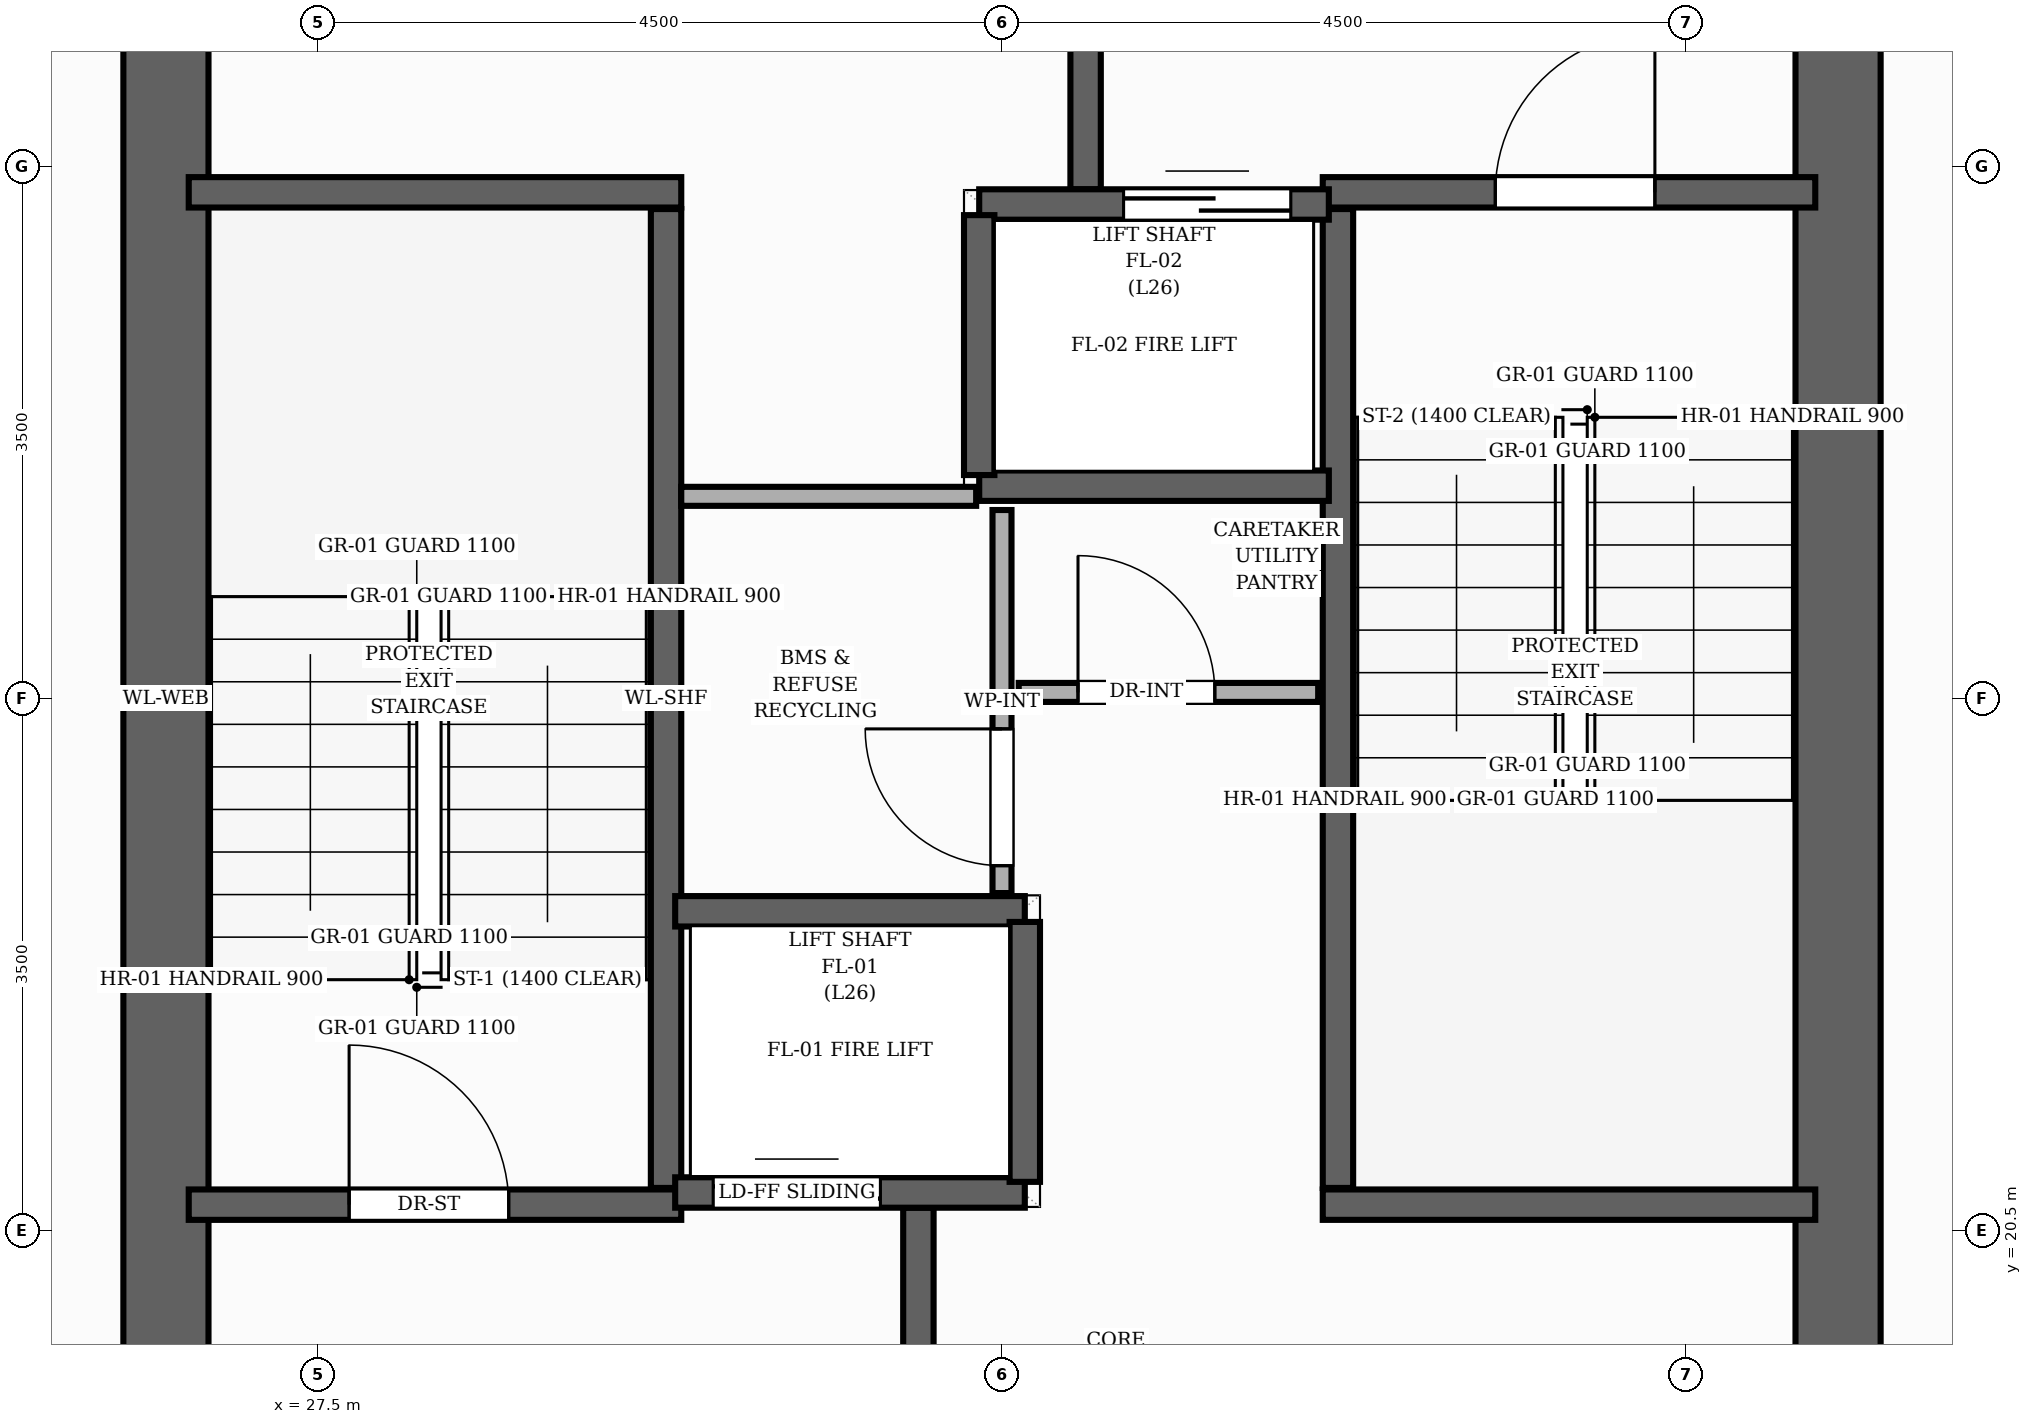
"""IFC4 building model, lengths in metres.
Left out: names, types, materials, properties, quantities, classifications, styles, units other than length and angle.
Written with IfcOpenShell. Run it as: python <this file> out.ifc"""

import sys

from ifc_helpers import new_model, si_unit, direction, frame, frame_2d, origin, place, context, subcontext, project, spatial, rectangle, extrude, element, fill, save


model = new_model("IFC4")
c1 = context("Model", 3, precision=1e-05, world=origin(), true_north=direction((0.0, 1.0)))
c2 = subcontext(c1, "Body", "Model", "MODEL_VIEW")
j1 = project(units=[si_unit("LENGTHUNIT", "METRE"), si_unit("PLANEANGLEUNIT", "RADIAN")], contexts=[c1])
p1 = place(None, origin())
s1 = spatial("IfcSite", under=j1, at=p1, CompositionType="ELEMENT")
p2 = place(p1, origin())
s2 = spatial("IfcBuilding", under=s1, at=p2, CompositionType="ELEMENT")
p3 = place(p2, frame((0.0, 0.0, 90.08)))
s3 = spatial("IfcBuildingStorey", under=s2, at=p3, CompositionType="ELEMENT", Elevation=90.08)
for number, where, z_axis, x_axis in (
    (1, (26.5, 17.35, 0.0), (0.0, 0.0, 1.0), (0.0, 1.0, 0.0)),
    (2, (37.5, 17.35, 0.0), (0.0, 0.0, 1.0), (0.0, 1.0, 0.0)),
):
    element("IfcWall", number, at=place(p3, frame(where, z_axis=z_axis, x_axis=x_axis)), inside=s3, PredefinedType="SHEAR", context=c2, shape_type="SweptSolid", body=[
        extrude(rectangle(XDim=13.3, YDim=0.56, at=frame_2d((6.65, 0.0))), origin(), (0.0, 0.0, 1.0), 3.2),
    ])
p4 = place(p3, frame((29.79, 20.78, 0.0), z_axis=(0.0, 0.0, 1.0), x_axis=(0.0, 1.0, 0.0)))
e3 = element("IfcWall", 3, at=p4, inside=s3, PredefinedType="SHEAR", context=c2, shape_type="SweptSolid", body=[
    extrude(rectangle(XDim=6.44, YDim=0.2, at=frame_2d((3.22, 0.0))), origin(), (0.0, 0.0, 1.0), 3.2),
])
p5 = place(p3, frame((26.65, 27.33, 0.0), z_axis=(0.0, 0.0, 1.0), x_axis=(1.0, 0.0, 0.0)))
e4 = element("IfcWall", 4, at=p5, inside=s3, PredefinedType="SHEAR", context=c2, shape_type="SweptSolid", body=[
    extrude(rectangle(XDim=3.24, YDim=0.2, at=frame_2d((1.62, 0.0))), origin(), (0.0, 0.0, 1.0), 3.2),
])
p6 = place(p3, frame((26.65, 20.67, 0.0), z_axis=(0.0, 0.0, 1.0), x_axis=(1.0, 0.0, 0.0)))
e5 = element("IfcWall", 5, at=p6, inside=s3, PredefinedType="SHEAR", context=c2, shape_type="SweptSolid", body=[
    extrude(rectangle(XDim=3.24, YDim=0.2, at=frame_2d((1.62, 0.0))), origin(), (0.0, 0.0, 1.0), 3.2),
])
p7 = place(p6, frame((1.055, 0.0, 0.0)))
e6 = element("IfcOpeningElement", 6, at=p7, cuts=e5, PredefinedType="OPENING", context=c2, shape_type="SweptSolid", body=[
    extrude(rectangle(XDim=1.05, YDim=2.15, at=frame_2d((0.525, 1.075))), frame((0.0, 0.11, 0.0), z_axis=(0.0, -1.0, 0.0), x_axis=(1.0, 0.0, 0.0)), (0.0, 0.0, 1.0), 0.22),
])
p8 = place(p3, frame((34.21, 20.78, 0.0), z_axis=(0.0, 0.0, 1.0), x_axis=(0.0, 1.0, 0.0)))
e7 = element("IfcWall", 7, at=p8, inside=s3, PredefinedType="SHEAR", context=c2, shape_type="SweptSolid", body=[
    extrude(rectangle(XDim=6.44, YDim=0.2, at=frame_2d((3.22, 0.0))), origin(), (0.0, 0.0, 1.0), 3.2),
])
p9 = place(p3, frame((34.11, 20.67, 0.0), z_axis=(0.0, 0.0, 1.0), x_axis=(1.0, 0.0, 0.0)))
e8 = element("IfcWall", 8, at=p9, inside=s3, PredefinedType="SHEAR", context=c2, shape_type="SweptSolid", body=[
    extrude(rectangle(XDim=3.24, YDim=0.2, at=frame_2d((1.62, 0.0))), origin(), (0.0, 0.0, 1.0), 3.2),
])
p10 = place(p3, frame((34.11, 27.33, 0.0), z_axis=(0.0, 0.0, 1.0), x_axis=(1.0, 0.0, 0.0)))
e9 = element("IfcWall", 9, at=p10, inside=s3, PredefinedType="SHEAR", context=c2, shape_type="SweptSolid", body=[
    extrude(rectangle(XDim=3.24, YDim=0.2, at=frame_2d((1.62, 0.0))), origin(), (0.0, 0.0, 1.0), 3.2),
])
p11 = place(p10, frame((1.135, 0.0, 0.0)))
e10 = element("IfcOpeningElement", 10, at=p11, cuts=e9, PredefinedType="OPENING", context=c2, shape_type="SweptSolid", body=[
    extrude(rectangle(XDim=1.05, YDim=2.15, at=frame_2d((0.525, 1.075))), frame((0.0, 0.11, 0.0), z_axis=(0.0, -1.0, 0.0), x_axis=(1.0, 0.0, 0.0)), (0.0, 0.0, 1.0), 0.22),
])
for number, where, z_axis, x_axis in (
    (11, (31.45, 17.15, 0.0), (0.0, 0.0, 1.0), (0.0, 1.0, 0.0)),
    (12, (32.55, 27.35, 0.0), (0.0, 0.0, 1.0), (0.0, 1.0, 0.0)),
):
    element("IfcWall", number, at=place(p3, frame(where, z_axis=z_axis, x_axis=x_axis)), inside=s3, PredefinedType="SHEAR", context=c2, shape_type="SweptSolid", body=[
        extrude(rectangle(XDim=3.5, YDim=0.2, at=frame_2d((1.75, 0.0))), origin(), (0.0, 0.0, 1.0), 3.2),
    ])
p12 = place(p3, frame((29.85, 20.75, 0.0), z_axis=(0.0, 0.0, 1.0), x_axis=(1.0, 0.0, 0.0)))
e13 = element("IfcWall", 13, at=p12, inside=s3, PredefinedType="SHEAR", context=c2, shape_type="SweptSolid", body=[
    extrude(rectangle(XDim=2.3, YDim=0.2, at=frame_2d((1.15, 0.0))), origin(), (0.0, 0.0, 1.0), 3.2),
])
p13 = place(p12, frame((0.25, 0.0, 0.0)))
e14 = element("IfcOpeningElement", 14, at=p13, cuts=e13, PredefinedType="OPENING", context=c2, shape_type="SweptSolid", body=[
    extrude(rectangle(XDim=1.1, YDim=2.15, at=frame_2d((0.55, 1.075))), frame((0.0, 0.11, 0.0), z_axis=(0.0, -1.0, 0.0), x_axis=(1.0, 0.0, 0.0)), (0.0, 0.0, 1.0), 0.22),
])
p14 = place(p3, frame((29.85, 22.6, 0.0), z_axis=(0.0, 0.0, 1.0), x_axis=(1.0, 0.0, 0.0)))
e15 = element("IfcWall", 15, at=p14, inside=s3, PredefinedType="SHEAR", context=c2, shape_type="SweptSolid", body=[
    extrude(rectangle(XDim=2.3, YDim=0.2, at=frame_2d((1.15, 0.0))), origin(), (0.0, 0.0, 1.0), 3.2),
])
p15 = place(p3, frame((32.15, 20.82, 0.0), z_axis=(0.0, 0.0, 1.0), x_axis=(0.0, 1.0, 0.0)))
e16 = element("IfcWall", 16, at=p15, inside=s3, PredefinedType="SHEAR", context=c2, shape_type="SweptSolid", body=[
    extrude(rectangle(XDim=1.71, YDim=0.2, at=frame_2d((0.855, 0.0))), origin(), (0.0, 0.0, 1.0), 3.2),
])
p16 = place(p3, frame((31.85, 27.25, 0.0), z_axis=(0.0, 0.0, 1.0), x_axis=(1.0, 0.0, 0.0)))
e17 = element("IfcWall", 17, at=p16, inside=s3, PredefinedType="SHEAR", context=c2, shape_type="SweptSolid", body=[
    extrude(rectangle(XDim=2.3, YDim=0.2, at=frame_2d((1.15, 0.0))), origin(), (0.0, 0.0, 1.0), 3.2),
])
p17 = place(p16, frame((0.95, 0.0, 0.0)))
e18 = element("IfcOpeningElement", 18, at=p17, cuts=e17, PredefinedType="OPENING", context=c2, shape_type="SweptSolid", body=[
    extrude(rectangle(XDim=1.1, YDim=2.15, at=frame_2d((0.55, 1.075))), frame((0.0, 0.11, 0.0), z_axis=(0.0, -1.0, 0.0), x_axis=(1.0, 0.0, 0.0)), (0.0, 0.0, 1.0), 0.22),
])
p18 = place(p3, frame((31.85, 25.4, 0.0), z_axis=(0.0, 0.0, 1.0), x_axis=(1.0, 0.0, 0.0)))
e19 = element("IfcWall", 19, at=p18, inside=s3, PredefinedType="SHEAR", context=c2, shape_type="SweptSolid", body=[
    extrude(rectangle(XDim=2.3, YDim=0.2, at=frame_2d((1.15, 0.0))), origin(), (0.0, 0.0, 1.0), 3.2),
])
p19 = place(p3, frame((31.85, 25.47, 0.0), z_axis=(0.0, 0.0, 1.0), x_axis=(0.0, 1.0, 0.0)))
e20 = element("IfcWall", 20, at=p19, inside=s3, PredefinedType="SHEAR", context=c2, shape_type="SweptSolid", body=[
    extrude(rectangle(XDim=1.71, YDim=0.2, at=frame_2d((0.855, 0.0))), origin(), (0.0, 0.0, 1.0), 3.2),
])
p20 = place(p3, frame((32.0, 22.72, 0.0), z_axis=(0.0, 0.0, 1.0), x_axis=(0.0, 1.0, 0.0)))
e21 = element("IfcWall", 21, at=p20, inside=s3, PredefinedType="PARTITIONING", context=c2, shape_type="SweptSolid", body=[
    extrude(rectangle(XDim=2.52, YDim=0.125, at=frame_2d((1.26, 0.0))), origin(), (0.0, 0.0, 1.0), 2.955),
])
p21 = place(p20, frame((0.18, 0.0, 0.0)))
e22 = element("IfcOpeningElement", 22, at=p21, cuts=e21, PredefinedType="OPENING", context=c2, shape_type="SweptSolid", body=[
    extrude(rectangle(XDim=0.9, YDim=2.1, at=frame_2d((0.45, 1.05))), frame((0.0, 0.073, 0.0), z_axis=(0.0, -1.0, 0.0), x_axis=(1.0, 0.0, 0.0)), (0.0, 0.0, 1.0), 0.145),
])
p22 = place(p3, frame((32.11, 24.04, 0.0), z_axis=(0.0, 0.0, 1.0), x_axis=(1.0, 0.0, 0.0)))
e23 = element("IfcWall", 23, at=p22, inside=s3, PredefinedType="PARTITIONING", context=c2, shape_type="SweptSolid", body=[
    extrude(rectangle(XDim=1.97, YDim=0.125, at=frame_2d((0.985, 0.0))), origin(), (0.0, 0.0, 1.0), 2.955),
])
p23 = place(p22, frame((0.39, 0.0, 0.0)))
e24 = element("IfcOpeningElement", 24, at=p23, cuts=e23, PredefinedType="OPENING", context=c2, shape_type="SweptSolid", body=[
    extrude(rectangle(XDim=0.9, YDim=2.1, at=frame_2d((0.45, 1.05))), frame((0.0, 0.073, 0.0), z_axis=(0.0, -1.0, 0.0), x_axis=(1.0, 0.0, 0.0)), (0.0, 0.0, 1.0), 0.145),
])
p24 = place(p3, frame((29.89, 25.33, 0.0), z_axis=(0.0, 0.0, 1.0), x_axis=(1.0, 0.0, 0.0)))
e25 = element("IfcWall", 25, at=p24, inside=s3, PredefinedType="PARTITIONING", context=c2, shape_type="SweptSolid", body=[
    extrude(rectangle(XDim=1.94, YDim=0.125, at=frame_2d((0.97, 0.0))), origin(), (0.0, 0.0, 1.0), 2.955),
])
p25 = place(p7, origin())
e26 = element("IfcDoor", 26, at=p25, inside=s3, OperationType="SINGLE_SWING_LEFT", PredefinedType="DOOR", context=c2, shape_type="SweptSolid", body=[
    extrude(rectangle(XDim=1.05, YDim=2.15, at=frame_2d((0.525, 1.075))), frame((0.0, 0.025, 0.0), z_axis=(0.0, -1.0, 0.0), x_axis=(1.0, 0.0, 0.0)), (0.0, 0.0, 1.0), 0.05),
])
fill(e6, e26)
p26 = place(p11, origin())
e27 = element("IfcDoor", 27, at=p26, inside=s3, OperationType="SINGLE_SWING_RIGHT", PredefinedType="DOOR", context=c2, shape_type="SweptSolid", body=[
    extrude(rectangle(XDim=1.05, YDim=2.15, at=frame_2d((0.525, 1.075))), frame((0.0, 0.025, 0.0), z_axis=(0.0, -1.0, 0.0), x_axis=(1.0, 0.0, 0.0)), (0.0, 0.0, 1.0), 0.05),
])
fill(e10, e27)
p27 = place(p13, origin())
e28 = element("IfcDoor", 28, at=p27, inside=s3, OperationType="DOUBLE_DOOR_SLIDING", PredefinedType="DOOR", context=c2, shape_type="SweptSolid", body=[
    extrude(rectangle(XDim=1.1, YDim=2.15, at=frame_2d((0.55, 1.075))), frame((0.0, 0.025, 0.0), z_axis=(0.0, -1.0, 0.0), x_axis=(1.0, 0.0, 0.0)), (0.0, 0.0, 1.0), 0.05),
])
fill(e14, e28)
p28 = place(p17, origin())
e29 = element("IfcDoor", 29, at=p28, inside=s3, OperationType="DOUBLE_DOOR_SLIDING", PredefinedType="DOOR", context=c2, shape_type="SweptSolid", body=[
    extrude(rectangle(XDim=1.1, YDim=2.15, at=frame_2d((0.55, 1.075))), frame((0.0, 0.025, 0.0), z_axis=(0.0, -1.0, 0.0), x_axis=(1.0, 0.0, 0.0)), (0.0, 0.0, 1.0), 0.05),
])
fill(e18, e29)
p29 = place(p23, origin())
e30 = element("IfcDoor", 30, at=p29, inside=s3, OperationType="SINGLE_SWING_LEFT", PredefinedType="DOOR", context=c2, shape_type="SweptSolid", body=[
    extrude(rectangle(XDim=0.9, YDim=2.1, at=frame_2d((0.45, 1.05))), frame((0.0, 0.025, 0.0), z_axis=(0.0, -1.0, 0.0), x_axis=(1.0, 0.0, 0.0)), (0.0, 0.0, 1.0), 0.05),
])
fill(e24, e30)
p30 = place(p21, origin())
e31 = element("IfcDoor", 31, at=p30, inside=s3, OperationType="SINGLE_SWING_RIGHT", PredefinedType="DOOR", context=c2, shape_type="SweptSolid", body=[
    extrude(rectangle(XDim=0.9, YDim=2.1, at=frame_2d((0.45, 1.05))), frame((0.0, 0.025, 0.0), z_axis=(0.0, -1.0, 0.0), x_axis=(1.0, 0.0, 0.0)), (0.0, 0.0, 1.0), 0.05),
])
fill(e22, e31)
save(model, sys.argv[1])
